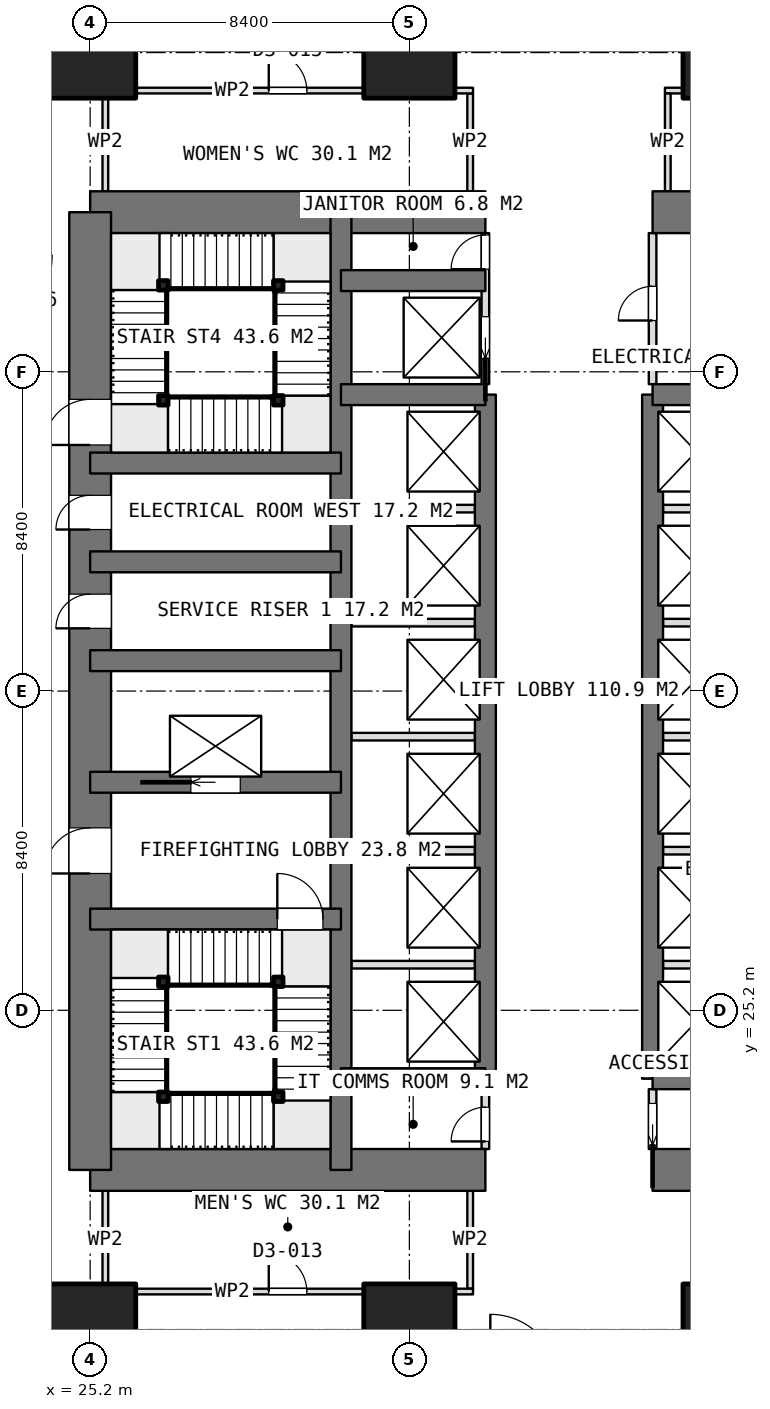
"""IFC4 building model, lengths in metres.
Left out: names, types, materials, properties, quantities, classifications, styles, units other than length and angle.
Written with IfcOpenShell. Run it as: python <this file> out.ifc"""

import sys

from ifc_helpers import new_model, si_unit, direction, frame, frame_2d, origin, origin_2d, place, context, subcontext, project, spatial, rectangle, extrude, element, fill, save


model = new_model("IFC4")
c1 = context("Model", 3, precision=1e-05, world=origin(), true_north=direction((0.0, 1.0)))
c2 = subcontext(c1, "Body", "Model", "MODEL_VIEW")
j1 = project(units=[si_unit("LENGTHUNIT", "METRE"), si_unit("PLANEANGLEUNIT", "RADIAN")], contexts=[c1])
p1 = place(None, origin())
s1 = spatial("IfcSite", under=j1, at=p1, CompositionType="ELEMENT")
p2 = place(p1, origin())
s2 = spatial("IfcBuilding", under=s1, at=p2, CompositionType="ELEMENT")
p3 = place(p2, frame((0.0, 0.0, 5.4)))
s3 = spatial("IfcBuildingStorey", under=s2, at=p3, CompositionType="ELEMENT", Elevation=5.4)
p4 = place(p3, frame((25.2, 21.0, 0.0), z_axis=(0.0, 0.0, 1.0), x_axis=(1.0, 0.0, 0.0)))
e1 = element("IfcWall", 1, at=p4, inside=s3, PredefinedType="SHEAR", context=c2, shape_type="SweptSolid", body=[
    extrude(rectangle(XDim=10.4, YDim=1.1, at=frame_2d((5.2, 0.0))), origin(), (0.0, 0.0, 1.0), 5.0),
])
p5 = place(p3, frame((40.0, 21.0, 0.0), z_axis=(0.0, 0.0, 1.0), x_axis=(1.0, 0.0, 0.0)))
e2 = element("IfcWall", 2, at=p5, inside=s3, PredefinedType="SHEAR", context=c2, shape_type="SweptSolid", body=[
    extrude(rectangle(XDim=10.4, YDim=1.1, at=frame_2d((5.2, 0.0))), origin(), (0.0, 0.0, 1.0), 5.0),
])
p6 = place(p3, frame((25.2, 46.2, 0.0), z_axis=(0.0, 0.0, 1.0), x_axis=(1.0, 0.0, 0.0)))
e3 = element("IfcWall", 3, at=p6, inside=s3, PredefinedType="SHEAR", context=c2, shape_type="SweptSolid", body=[
    extrude(rectangle(XDim=10.4, YDim=1.1, at=frame_2d((5.2, 0.0))), origin(), (0.0, 0.0, 1.0), 5.0),
])
p7 = place(p3, frame((40.0, 46.2, 0.0), z_axis=(0.0, 0.0, 1.0), x_axis=(1.0, 0.0, 0.0)))
e4 = element("IfcWall", 4, at=p7, inside=s3, PredefinedType="SHEAR", context=c2, shape_type="SweptSolid", body=[
    extrude(rectangle(XDim=10.4, YDim=1.1, at=frame_2d((5.2, 0.0))), origin(), (0.0, 0.0, 1.0), 5.0),
])
p8 = place(p3, frame((25.2, 21.0, 0.0), z_axis=(0.0, 0.0, 1.0), x_axis=(0.0, 1.0, 0.0)))
e5 = element("IfcWall", 5, at=p8, inside=s3, PredefinedType="SHEAR", context=c2, shape_type="SweptSolid", body=[
    extrude(rectangle(XDim=25.2, YDim=1.1, at=frame_2d((12.6, 0.0))), origin(), (0.0, 0.0, 1.0), 5.0),
])
p9 = place(p8, frame((7.8, 0.0, 0.0)))
e6 = element("IfcOpeningElement", 6, at=p9, cuts=e5, PredefinedType="OPENING", context=c2, shape_type="SweptSolid", body=[
    extrude(rectangle(XDim=1.2, YDim=2.1, at=frame_2d((0.6, 1.05))), frame((0.0, 0.56, 0.0), z_axis=(0.0, -1.0, 0.0), x_axis=(1.0, 0.0, 0.0)), (0.0, 0.0, 1.0), 1.12),
])
p10 = place(p8, frame((14.25, 0.0, 0.0)))
e7 = element("IfcOpeningElement", 7, at=p10, cuts=e5, PredefinedType="OPENING", context=c2, shape_type="SweptSolid", body=[
    extrude(rectangle(XDim=0.9, YDim=2.1, at=frame_2d((0.45, 1.05))), frame((0.0, 0.56, 0.0), z_axis=(0.0, -1.0, 0.0), x_axis=(1.0, 0.0, 0.0)), (0.0, 0.0, 1.0), 1.12),
])
p11 = place(p8, frame((16.85, 0.0, 0.0)))
e8 = element("IfcOpeningElement", 8, at=p11, cuts=e5, PredefinedType="OPENING", context=c2, shape_type="SweptSolid", body=[
    extrude(rectangle(XDim=0.9, YDim=2.1, at=frame_2d((0.45, 1.05))), frame((0.0, 0.56, 0.0), z_axis=(0.0, -1.0, 0.0), x_axis=(1.0, 0.0, 0.0)), (0.0, 0.0, 1.0), 1.12),
])
p12 = place(p8, frame((19.075, 0.0, 0.0)))
e9 = element("IfcOpeningElement", 9, at=p12, cuts=e5, PredefinedType="OPENING", context=c2, shape_type="SweptSolid", body=[
    extrude(rectangle(XDim=1.2, YDim=2.1, at=frame_2d((0.6, 1.05))), frame((0.0, 0.56, 0.0), z_axis=(0.0, -1.0, 0.0), x_axis=(1.0, 0.0, 0.0)), (0.0, 0.0, 1.0), 1.12),
])
p13 = place(p3, frame((31.8, 21.0, 0.0), z_axis=(0.0, 0.0, 1.0), x_axis=(0.0, 1.0, 0.0)))
e10 = element("IfcWall", 10, at=p13, inside=s3, PredefinedType="SHEAR", context=c2, shape_type="SweptSolid", body=[
    extrude(rectangle(XDim=25.2, YDim=0.55, at=frame_2d((12.6, 0.0))), origin(), (0.0, 0.0, 1.0), 5.0),
])
for number, where, z_axis, x_axis in (
    (11, (35.6, 23.4, 0.0), (0.0, 0.0, 1.0), (0.0, 1.0, 0.0)),
    (12, (40.0, 23.4, 0.0), (0.0, 0.0, 1.0), (0.0, 1.0, 0.0)),
):
    element("IfcWall", number, at=place(p3, frame(where, z_axis=z_axis, x_axis=x_axis)), inside=s3, PredefinedType="SHEAR", context=c2, shape_type="SweptSolid", body=[
        extrude(rectangle(XDim=18.0, YDim=0.55, at=frame_2d((9.0, 0.0))), origin(), (0.0, 0.0, 1.0), 5.0),
    ])
for number, where, z_axis, x_axis in (
    (13, (31.8, 23.4, 0.0), (0.0, 0.0, 1.0), (1.0, 0.0, 0.0)),
    (14, (31.8, 41.4, 0.0), (0.0, 0.0, 1.0), (1.0, 0.0, 0.0)),
    (15, (31.8, 44.4, 0.0), (0.0, 0.0, 1.0), (1.0, 0.0, 0.0)),
    (16, (40.0, 23.4, 0.0), (0.0, 0.0, 1.0), (1.0, 0.0, 0.0)),
    (17, (40.0, 41.4, 0.0), (0.0, 0.0, 1.0), (1.0, 0.0, 0.0)),
):
    element("IfcWall", number, at=place(p3, frame(where, z_axis=z_axis, x_axis=x_axis)), inside=s3, PredefinedType="SHEAR", context=c2, shape_type="SweptSolid", body=[
        extrude(rectangle(XDim=3.8, YDim=0.55, at=frame_2d((1.9, 0.0))), origin(), (0.0, 0.0, 1.0), 5.0),
    ])
p14 = place(p3, frame((25.2, 27.6, 0.0), z_axis=(0.0, 0.0, 1.0), x_axis=(1.0, 0.0, 0.0)))
e18 = element("IfcWall", 18, at=p14, inside=s3, PredefinedType="SHEAR", context=c2, shape_type="SweptSolid", body=[
    extrude(rectangle(XDim=6.6, YDim=0.55, at=frame_2d((3.3, 0.0))), origin(), (0.0, 0.0, 1.0), 5.0),
])
p15 = place(p14, frame((4.925, 0.0, 0.0)))
e19 = element("IfcOpeningElement", 19, at=p15, cuts=e18, PredefinedType="OPENING", context=c2, shape_type="SweptSolid", body=[
    extrude(rectangle(XDim=1.2, YDim=2.1, at=frame_2d((0.6, 1.05))), frame((0.0, 0.285, 0.0), z_axis=(0.0, -1.0, 0.0), x_axis=(1.0, 0.0, 0.0)), (0.0, 0.0, 1.0), 0.57),
])
p16 = place(p3, frame((25.2, 31.2, 0.0), z_axis=(0.0, 0.0, 1.0), x_axis=(1.0, 0.0, 0.0)))
e20 = element("IfcWall", 20, at=p16, inside=s3, PredefinedType="SHEAR", context=c2, shape_type="SweptSolid", body=[
    extrude(rectangle(XDim=6.6, YDim=0.55, at=frame_2d((3.3, 0.0))), origin(), (0.0, 0.0, 1.0), 5.0),
])
p17 = place(p16, frame((2.65, 0.0, 0.0)))
e21 = element("IfcOpeningElement", 21, at=p17, cuts=e20, PredefinedType="OPENING", context=c2, shape_type="SweptSolid", body=[
    extrude(rectangle(XDim=1.3, YDim=2.1, at=frame_2d((0.65, 1.05))), frame((0.0, 0.285, 0.0), z_axis=(0.0, -1.0, 0.0), x_axis=(1.0, 0.0, 0.0)), (0.0, 0.0, 1.0), 0.57),
])
for number, where, z_axis, x_axis in (
    (22, (25.2, 34.4, 0.0), (0.0, 0.0, 1.0), (1.0, 0.0, 0.0)),
    (23, (25.2, 37.0, 0.0), (0.0, 0.0, 1.0), (1.0, 0.0, 0.0)),
    (24, (25.2, 39.6, 0.0), (0.0, 0.0, 1.0), (1.0, 0.0, 0.0)),
):
    element("IfcWall", number, at=place(p3, frame(where, z_axis=z_axis, x_axis=x_axis)), inside=s3, PredefinedType="SHEAR", context=c2, shape_type="SweptSolid", body=[
        extrude(rectangle(XDim=6.6, YDim=0.55, at=frame_2d((3.3, 0.0))), origin(), (0.0, 0.0, 1.0), 5.0),
    ])
for number, where, z_axis, x_axis in (
    (25, (25.2, 16.8, 0.0), (0.0, 0.0, 1.0), (1.0, 0.0, 0.0)),
    (26, (25.2, 50.4, 0.0), (0.0, 0.0, 1.0), (1.0, 0.0, 0.0)),
    (27, (33.6, 16.8, 0.0), (0.0, 0.0, 1.0), (1.0, 0.0, 0.0)),
    (28, (33.6, 50.4, 0.0), (0.0, 0.0, 1.0), (1.0, 0.0, 0.0)),
    (29, (42.0, 16.8, 0.0), (0.0, 0.0, 1.0), (1.0, 0.0, 0.0)),
    (30, (42.0, 50.4, 0.0), (0.0, 0.0, 1.0), (1.0, 0.0, 0.0)),
):
    element("IfcColumn", number, at=place(p3, frame(where, z_axis=z_axis, x_axis=x_axis)), inside=s3, PredefinedType="COLUMN", context=c2, shape_type="SweptSolid", body=[
        extrude(rectangle(XDim=2.4, YDim=2.4, at=origin_2d()), origin(), (0.0, 0.0, 1.0), 5.0),
    ])
for number, where, z_axis, x_axis in (
    (31, (32.075, 26.4, 0.0), (0.0, 0.0, 1.0), (1.0, 0.0, 0.0)),
    (32, (32.075, 29.4, 0.0), (0.0, 0.0, 1.0), (1.0, 0.0, 0.0)),
    (33, (32.075, 32.4, 0.0), (0.0, 0.0, 1.0), (1.0, 0.0, 0.0)),
    (34, (32.075, 35.4, 0.0), (0.0, 0.0, 1.0), (1.0, 0.0, 0.0)),
    (35, (32.075, 38.4, 0.0), (0.0, 0.0, 1.0), (1.0, 0.0, 0.0)),
    (36, (40.275, 26.4, 0.0), (0.0, 0.0, 1.0), (1.0, 0.0, 0.0)),
    (37, (40.275, 29.4, 0.0), (0.0, 0.0, 1.0), (1.0, 0.0, 0.0)),
    (38, (40.275, 32.4, 0.0), (0.0, 0.0, 1.0), (1.0, 0.0, 0.0)),
    (39, (40.275, 35.4, 0.0), (0.0, 0.0, 1.0), (1.0, 0.0, 0.0)),
    (40, (40.275, 38.4, 0.0), (0.0, 0.0, 1.0), (1.0, 0.0, 0.0)),
):
    element("IfcWall", number, at=place(p3, frame(where, z_axis=z_axis, x_axis=x_axis)), inside=s3, PredefinedType="PARTITIONING", context=c2, shape_type="SweptSolid", body=[
        extrude(rectangle(XDim=3.25, YDim=0.2, at=frame_2d((1.625, 0.0))), origin(), (0.0, 0.0, 1.0), 4.7),
    ])
p18 = place(p3, frame((40.0, 21.55, 0.0), z_axis=(0.0, 0.0, 1.0), x_axis=(0.0, 1.0, 0.0)))
e41 = element("IfcWall", 41, at=p18, inside=s3, PredefinedType="PARTITIONING", context=c2, shape_type="SweptSolid", body=[
    extrude(rectangle(XDim=1.575, YDim=0.2, at=frame_2d((0.788, 0.0))), origin(), (0.0, 0.0, 1.0), 4.7),
])
p19 = place(p18, frame((0.1, 0.0, 0.0)))
e42 = element("IfcOpeningElement", 42, at=p19, cuts=e41, PredefinedType="OPENING", context=c2, shape_type="SweptSolid", body=[
    extrude(rectangle(XDim=1.1, YDim=2.1, at=frame_2d((0.55, 1.05))), frame((0.0, 0.11, 0.0), z_axis=(0.0, -1.0, 0.0), x_axis=(1.0, 0.0, 0.0)), (0.0, 0.0, 1.0), 0.22),
])
p20 = place(p3, frame((40.0, 41.675, 0.0), z_axis=(0.0, 0.0, 1.0), x_axis=(0.0, 1.0, 0.0)))
e43 = element("IfcWall", 43, at=p20, inside=s3, PredefinedType="PARTITIONING", context=c2, shape_type="SweptSolid", body=[
    extrude(rectangle(XDim=3.975, YDim=0.2, at=frame_2d((1.987, 0.0))), origin(), (0.0, 0.0, 1.0), 4.7),
])
p21 = place(p20, frame((1.675, 0.0, 0.0)))
e44 = element("IfcOpeningElement", 44, at=p21, cuts=e43, PredefinedType="OPENING", context=c2, shape_type="SweptSolid", body=[
    extrude(rectangle(XDim=0.9, YDim=2.1, at=frame_2d((0.45, 1.05))), frame((0.0, 0.11, 0.0), z_axis=(0.0, -1.0, 0.0), x_axis=(1.0, 0.0, 0.0)), (0.0, 0.0, 1.0), 0.22),
])
p22 = place(p3, frame((35.6, 41.675, 0.0), z_axis=(0.0, 0.0, 1.0), x_axis=(0.0, 1.0, 0.0)))
e45 = element("IfcWall", 45, at=p22, inside=s3, PredefinedType="PARTITIONING", context=c2, shape_type="SweptSolid", body=[
    extrude(rectangle(XDim=3.975, YDim=0.2, at=frame_2d((1.987, 0.0))), origin(), (0.0, 0.0, 1.0), 4.7),
])
p23 = place(p22, frame((3.025, 0.0, 0.0)))
e46 = element("IfcOpeningElement", 46, at=p23, cuts=e45, PredefinedType="OPENING", context=c2, shape_type="SweptSolid", body=[
    extrude(rectangle(XDim=0.9, YDim=2.1, at=frame_2d((0.45, 1.05))), frame((0.0, 0.11, 0.0), z_axis=(0.0, -1.0, 0.0), x_axis=(1.0, 0.0, 0.0)), (0.0, 0.0, 1.0), 0.22),
])
p24 = place(p22, frame((0.675, 0.0, 0.0)))
e47 = element("IfcOpeningElement", 47, at=p24, cuts=e45, PredefinedType="OPENING", context=c2, shape_type="SweptSolid", body=[
    extrude(rectangle(XDim=1.1, YDim=2.1, at=frame_2d((0.55, 1.05))), frame((0.0, 0.11, 0.0), z_axis=(0.0, -1.0, 0.0), x_axis=(1.0, 0.0, 0.0)), (0.0, 0.0, 1.0), 0.22),
])
p25 = place(p3, frame((35.6, 21.55, 0.0), z_axis=(0.0, 0.0, 1.0), x_axis=(0.0, 1.0, 0.0)))
e48 = element("IfcWall", 48, at=p25, inside=s3, PredefinedType="PARTITIONING", context=c2, shape_type="SweptSolid", body=[
    extrude(rectangle(XDim=1.575, YDim=0.2, at=frame_2d((0.788, 0.0))), origin(), (0.0, 0.0, 1.0), 4.7),
])
p26 = place(p25, frame((0.2, 0.0, 0.0)))
e49 = element("IfcOpeningElement", 49, at=p26, cuts=e48, PredefinedType="OPENING", context=c2, shape_type="SweptSolid", body=[
    extrude(rectangle(XDim=0.9, YDim=2.1, at=frame_2d((0.45, 1.05))), frame((0.0, 0.11, 0.0), z_axis=(0.0, -1.0, 0.0), x_axis=(1.0, 0.0, 0.0)), (0.0, 0.0, 1.0), 0.22),
])
p27 = place(p3, frame((40.325, 49.4, 0.0), z_axis=(0.0, 0.0, 1.0), x_axis=(1.0, 0.0, 0.0)))
e50 = element("IfcWall", 50, at=p27, inside=s3, PredefinedType="PARTITIONING", context=c2, shape_type="SweptSolid", body=[
    extrude(rectangle(XDim=9.75, YDim=0.15, at=frame_2d((4.875, 0.0))), origin(), (0.0, 0.0, 1.0), 4.7),
])
p28 = place(p27, frame((4.375, 0.0, 0.0)))
e51 = element("IfcOpeningElement", 51, at=p28, cuts=e50, PredefinedType="OPENING", context=c2, shape_type="SweptSolid", body=[
    extrude(rectangle(XDim=1.0, YDim=2.1, at=frame_2d((0.5, 1.05))), frame((0.0, 0.085, 0.0), z_axis=(0.0, -1.0, 0.0), x_axis=(1.0, 0.0, 0.0)), (0.0, 0.0, 1.0), 0.17),
])
p29 = place(p3, frame((40.4, 46.75, 0.0), z_axis=(0.0, 0.0, 1.0), x_axis=(0.0, 1.0, 0.0)))
e52 = element("IfcWall", 52, at=p29, inside=s3, PredefinedType="PARTITIONING", context=c2, shape_type="SweptSolid", body=[
    extrude(rectangle(XDim=2.575, YDim=0.15, at=frame_2d((1.288, 0.0))), origin(), (0.0, 0.0, 1.0), 4.7),
])
p30 = place(p3, frame((25.525, 49.4, 0.0), z_axis=(0.0, 0.0, 1.0), x_axis=(1.0, 0.0, 0.0)))
e53 = element("IfcWall", 53, at=p30, inside=s3, PredefinedType="PARTITIONING", context=c2, shape_type="SweptSolid", body=[
    extrude(rectangle(XDim=9.75, YDim=0.15, at=frame_2d((4.875, 0.0))), origin(), (0.0, 0.0, 1.0), 4.7),
])
p31 = place(p30, frame((4.375, 0.0, 0.0)))
e54 = element("IfcOpeningElement", 54, at=p31, cuts=e53, PredefinedType="OPENING", context=c2, shape_type="SweptSolid", body=[
    extrude(rectangle(XDim=1.0, YDim=2.1, at=frame_2d((0.5, 1.05))), frame((0.0, 0.085, 0.0), z_axis=(0.0, -1.0, 0.0), x_axis=(1.0, 0.0, 0.0)), (0.0, 0.0, 1.0), 0.17),
])
for number, where, z_axis, x_axis in (
    (55, (25.6, 46.75, 0.0), (0.0, 0.0, 1.0), (0.0, 1.0, 0.0)),
    (56, (35.2, 46.75, 0.0), (0.0, 0.0, 1.0), (0.0, 1.0, 0.0)),
):
    element("IfcWall", number, at=place(p3, frame(where, z_axis=z_axis, x_axis=x_axis)), inside=s3, PredefinedType="PARTITIONING", context=c2, shape_type="SweptSolid", body=[
        extrude(rectangle(XDim=2.575, YDim=0.15, at=frame_2d((1.288, 0.0))), origin(), (0.0, 0.0, 1.0), 4.7),
    ])
p32 = place(p3, frame((25.525, 17.8, 0.0), z_axis=(0.0, 0.0, 1.0), x_axis=(1.0, 0.0, 0.0)))
e57 = element("IfcWall", 57, at=p32, inside=s3, PredefinedType="PARTITIONING", context=c2, shape_type="SweptSolid", body=[
    extrude(rectangle(XDim=9.75, YDim=0.15, at=frame_2d((4.875, 0.0))), origin(), (0.0, 0.0, 1.0), 4.7),
])
p33 = place(p32, frame((4.375, 0.0, 0.0)))
e58 = element("IfcOpeningElement", 58, at=p33, cuts=e57, PredefinedType="OPENING", context=c2, shape_type="SweptSolid", body=[
    extrude(rectangle(XDim=1.0, YDim=2.1, at=frame_2d((0.5, 1.05))), frame((0.0, 0.085, 0.0), z_axis=(0.0, -1.0, 0.0), x_axis=(1.0, 0.0, 0.0)), (0.0, 0.0, 1.0), 0.17),
])
for number, where, z_axis, x_axis in (
    (59, (25.6, 17.875, 0.0), (0.0, 0.0, 1.0), (0.0, 1.0, 0.0)),
    (60, (35.2, 17.875, 0.0), (0.0, 0.0, 1.0), (0.0, 1.0, 0.0)),
):
    element("IfcWall", number, at=place(p3, frame(where, z_axis=z_axis, x_axis=x_axis)), inside=s3, PredefinedType="PARTITIONING", context=c2, shape_type="SweptSolid", body=[
        extrude(rectangle(XDim=2.575, YDim=0.15, at=frame_2d((1.288, 0.0))), origin(), (0.0, 0.0, 1.0), 4.7),
    ])
for number, where, z_axis, x_axis in (
    (61, (30.15, 25.95, 0.0), (0.0, 0.0, 1.0), (1.0, 0.0, 0.0)),
    (62, (30.15, 22.925, 0.0), (0.0, 0.0, 1.0), (1.0, 0.0, 0.0)),
    (63, (27.125, 22.925, 0.0), (0.0, 0.0, 1.0), (1.0, 0.0, 0.0)),
    (64, (27.125, 25.95, 0.0), (0.0, 0.0, 1.0), (1.0, 0.0, 0.0)),
    (65, (27.125, 41.25, 0.0), (0.0, 0.0, 1.0), (1.0, 0.0, 0.0)),
    (66, (30.15, 41.25, 0.0), (0.0, 0.0, 1.0), (1.0, 0.0, 0.0)),
    (67, (30.15, 44.275, 0.0), (0.0, 0.0, 1.0), (1.0, 0.0, 0.0)),
    (68, (27.125, 44.275, 0.0), (0.0, 0.0, 1.0), (1.0, 0.0, 0.0)),
):
    element("IfcColumn", number, at=place(p3, frame(where, z_axis=z_axis, x_axis=x_axis)), inside=s3, PredefinedType="COLUMN", context=c2, shape_type="SweptSolid", body=[
        extrude(rectangle(XDim=0.25, YDim=0.25, at=origin_2d()), origin(), (0.0, 0.0, 1.0), 5.0),
    ])
p34 = place(p9, origin())
e69 = element("IfcDoor", 69, at=p34, inside=s3, OperationType="SINGLE_SWING_LEFT", PredefinedType="DOOR", context=c2, shape_type="SweptSolid", body=[
    extrude(rectangle(XDim=1.2, YDim=2.1, at=frame_2d((0.6, 1.05))), frame((0.0, 0.025, 0.0), z_axis=(0.0, -1.0, 0.0), x_axis=(1.0, 0.0, 0.0)), (0.0, 0.0, 1.0), 0.05),
])
fill(e6, e69)
p35 = place(p10, origin())
e70 = element("IfcDoor", 70, at=p35, inside=s3, OperationType="SINGLE_SWING_LEFT", PredefinedType="DOOR", context=c2, shape_type="SweptSolid", body=[
    extrude(rectangle(XDim=0.9, YDim=2.1, at=frame_2d((0.45, 1.05))), frame((0.0, 0.025, 0.0), z_axis=(0.0, -1.0, 0.0), x_axis=(1.0, 0.0, 0.0)), (0.0, 0.0, 1.0), 0.05),
])
fill(e7, e70)
p36 = place(p11, origin())
e71 = element("IfcDoor", 71, at=p36, inside=s3, OperationType="SINGLE_SWING_LEFT", PredefinedType="DOOR", context=c2, shape_type="SweptSolid", body=[
    extrude(rectangle(XDim=0.9, YDim=2.1, at=frame_2d((0.45, 1.05))), frame((0.0, 0.025, 0.0), z_axis=(0.0, -1.0, 0.0), x_axis=(1.0, 0.0, 0.0)), (0.0, 0.0, 1.0), 0.05),
])
fill(e8, e71)
p37 = place(p19, origin())
e72 = element("IfcDoor", 72, at=p37, inside=s3, OperationType="SLIDING_TO_LEFT", PredefinedType="DOOR", context=c2, shape_type="SweptSolid", body=[
    extrude(rectangle(XDim=1.1, YDim=2.1, at=frame_2d((0.55, 1.05))), frame((0.0, 0.025, 0.0), z_axis=(0.0, -1.0, 0.0), x_axis=(1.0, 0.0, 0.0)), (0.0, 0.0, 1.0), 0.05),
])
fill(e42, e72)
p38 = place(p26, origin())
e73 = element("IfcDoor", 73, at=p38, inside=s3, OperationType="SINGLE_SWING_LEFT", PredefinedType="DOOR", context=c2, shape_type="SweptSolid", body=[
    extrude(rectangle(XDim=0.9, YDim=2.1, at=frame_2d((0.45, 1.05))), frame((0.0, 0.025, 0.0), z_axis=(0.0, -1.0, 0.0), x_axis=(1.0, 0.0, 0.0)), (0.0, 0.0, 1.0), 0.05),
])
fill(e49, e73)
p39 = place(p21, origin())
e74 = element("IfcDoor", 74, at=p39, inside=s3, OperationType="SINGLE_SWING_LEFT", PredefinedType="DOOR", context=c2, shape_type="SweptSolid", body=[
    extrude(rectangle(XDim=0.9, YDim=2.1, at=frame_2d((0.45, 1.05))), frame((0.0, 0.025, 0.0), z_axis=(0.0, -1.0, 0.0), x_axis=(1.0, 0.0, 0.0)), (0.0, 0.0, 1.0), 0.05),
])
fill(e44, e74)
p40 = place(p23, origin())
e75 = element("IfcDoor", 75, at=p40, inside=s3, OperationType="SINGLE_SWING_LEFT", PredefinedType="DOOR", context=c2, shape_type="SweptSolid", body=[
    extrude(rectangle(XDim=0.9, YDim=2.1, at=frame_2d((0.45, 1.05))), frame((0.0, 0.025, 0.0), z_axis=(0.0, -1.0, 0.0), x_axis=(1.0, 0.0, 0.0)), (0.0, 0.0, 1.0), 0.05),
])
fill(e46, e75)
p41 = place(p17, origin())
e76 = element("IfcDoor", 76, at=p41, inside=s3, OperationType="SLIDING_TO_LEFT", PredefinedType="USERDEFINED", context=c2, shape_type="SweptSolid", body=[
    extrude(rectangle(XDim=1.3, YDim=2.1, at=frame_2d((0.65, 1.05))), frame((0.0, 0.025, 0.0), z_axis=(0.0, -1.0, 0.0), x_axis=(1.0, 0.0, 0.0)), (0.0, 0.0, 1.0), 0.05),
])
fill(e21, e76)
p42 = place(p24, origin())
e77 = element("IfcDoor", 77, at=p42, inside=s3, OperationType="SLIDING_TO_LEFT", PredefinedType="USERDEFINED", context=c2, shape_type="SweptSolid", body=[
    extrude(rectangle(XDim=1.1, YDim=2.1, at=frame_2d((0.55, 1.05))), frame((0.0, 0.025, 0.0), z_axis=(0.0, -1.0, 0.0), x_axis=(1.0, 0.0, 0.0)), (0.0, 0.0, 1.0), 0.05),
])
fill(e47, e77)
p43 = place(p31, origin())
e78 = element("IfcDoor", 78, at=p43, inside=s3, OperationType="SINGLE_SWING_LEFT", PredefinedType="DOOR", context=c2, shape_type="SweptSolid", body=[
    extrude(rectangle(XDim=1.0, YDim=2.1, at=frame_2d((0.5, 1.05))), frame((0.0, 0.025, 0.0), z_axis=(0.0, -1.0, 0.0), x_axis=(1.0, 0.0, 0.0)), (0.0, 0.0, 1.0), 0.05),
])
fill(e54, e78)
p44 = place(p33, origin())
e79 = element("IfcDoor", 79, at=p44, inside=s3, OperationType="SINGLE_SWING_LEFT", PredefinedType="DOOR", context=c2, shape_type="SweptSolid", body=[
    extrude(rectangle(XDim=1.0, YDim=2.1, at=frame_2d((0.5, 1.05))), frame((0.0, 0.025, 0.0), z_axis=(0.0, -1.0, 0.0), x_axis=(1.0, 0.0, 0.0)), (0.0, 0.0, 1.0), 0.05),
])
fill(e58, e79)
p45 = place(p15, origin())
e80 = element("IfcDoor", 80, at=p45, inside=s3, OperationType="SINGLE_SWING_RIGHT", PredefinedType="DOOR", context=c2, shape_type="SweptSolid", body=[
    extrude(rectangle(XDim=1.2, YDim=2.1, at=frame_2d((0.6, 1.05))), frame((0.0, 0.025, 0.0), z_axis=(0.0, -1.0, 0.0), x_axis=(1.0, 0.0, 0.0)), (0.0, 0.0, 1.0), 0.05),
])
fill(e19, e80)
p46 = place(p12, origin())
e81 = element("IfcDoor", 81, at=p46, inside=s3, OperationType="SINGLE_SWING_RIGHT", PredefinedType="DOOR", context=c2, shape_type="SweptSolid", body=[
    extrude(rectangle(XDim=1.2, YDim=2.1, at=frame_2d((0.6, 1.05))), frame((0.0, 0.025, 0.0), z_axis=(0.0, -1.0, 0.0), x_axis=(1.0, 0.0, 0.0)), (0.0, 0.0, 1.0), 0.05),
])
fill(e9, e81)
save(model, sys.argv[1])
